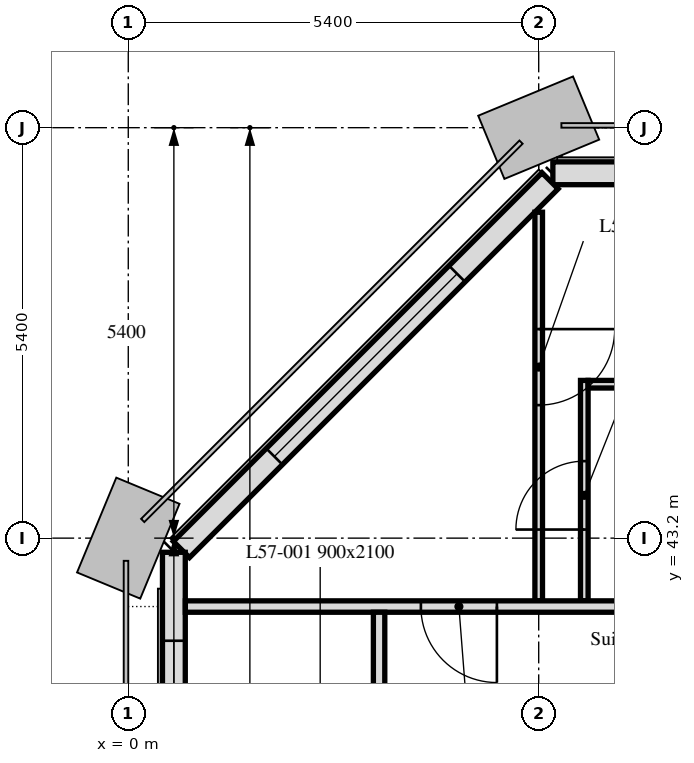
"""IFC4 building model, lengths in metres.
Left out: names, types, materials, properties, quantities, classifications, styles, units other than length and angle.
Written with IfcOpenShell. Run it as: python <this file> out.ifc"""

import sys

from ifc_helpers import new_model, si_unit, direction, frame, frame_2d, origin, place, context, subcontext, project, spatial, rectangle, extrude, element, fill, save


model = new_model("IFC4")
c1 = context("Model", 3, precision=1e-05, world=origin(), true_north=direction((0.0, 1.0)))
c2 = subcontext(c1, "Body", "Model", "MODEL_VIEW")
j1 = project(units=[si_unit("LENGTHUNIT", "METRE"), si_unit("PLANEANGLEUNIT", "RADIAN")], contexts=[c1])
p1 = place(None, origin())
s1 = spatial("IfcSite", under=j1, at=p1, CompositionType="ELEMENT")
p2 = place(p1, origin())
s2 = spatial("IfcBuilding", under=s1, at=p2, CompositionType="ELEMENT")
p3 = place(p2, frame((0.0, 0.0, 226.9)))
s3 = spatial("IfcBuildingStorey", under=s2, at=p3, CompositionType="ELEMENT", Elevation=226.9)
p4 = place(p3, frame((37.614, 48.0, 0.0), z_axis=(0.0, 0.0, 1.0), x_axis=(-1.0, 0.0, 0.0)))
e1 = element("IfcWall", 1, at=p4, inside=s3, PredefinedType="SOLIDWALL", context=c2, shape_type="SweptSolid", body=[
    extrude(rectangle(XDim=32.027, YDim=0.3, at=frame_2d((16.014, 0.0))), origin(), (0.0, 0.0, 1.0), 3.0),
])
p5 = place(p4, frame((0.814, 0.0, 0.9)))
e2 = element("IfcOpeningElement", 2, at=p5, cuts=e1, PredefinedType="OPENING", context=c2, shape_type="SweptSolid", body=[
    extrude(rectangle(XDim=3.4, YDim=1.7, at=frame_2d((1.7, 0.85))), frame((0.0, 0.16, 0.0), z_axis=(0.0, -1.0, 0.0), x_axis=(1.0, 0.0, 0.0)), (0.0, 0.0, 1.0), 0.32),
])
p6 = place(p4, frame((6.564, 0.0, 0.9)))
e3 = element("IfcOpeningElement", 3, at=p6, cuts=e1, PredefinedType="OPENING", context=c2, shape_type="SweptSolid", body=[
    extrude(rectangle(XDim=1.1, YDim=1.7, at=frame_2d((0.55, 0.85))), frame((0.0, 0.16, 0.0), z_axis=(0.0, -1.0, 0.0), x_axis=(1.0, 0.0, 0.0)), (0.0, 0.0, 1.0), 0.32),
])
p7 = place(p4, frame((11.614, 0.0, 0.9)))
e4 = element("IfcOpeningElement", 4, at=p7, cuts=e1, PredefinedType="OPENING", context=c2, shape_type="SweptSolid", body=[
    extrude(rectangle(XDim=3.4, YDim=1.7, at=frame_2d((1.7, 0.85))), frame((0.0, 0.16, 0.0), z_axis=(0.0, -1.0, 0.0), x_axis=(1.0, 0.0, 0.0)), (0.0, 0.0, 1.0), 0.32),
])
p8 = place(p4, frame((17.364, 0.0, 0.9)))
e5 = element("IfcOpeningElement", 5, at=p8, cuts=e1, PredefinedType="OPENING", context=c2, shape_type="SweptSolid", body=[
    extrude(rectangle(XDim=1.1, YDim=1.7, at=frame_2d((0.55, 0.85))), frame((0.0, 0.16, 0.0), z_axis=(0.0, -1.0, 0.0), x_axis=(1.0, 0.0, 0.0)), (0.0, 0.0, 1.0), 0.32),
])
p9 = place(p4, frame((22.414, 0.0, 0.9)))
e6 = element("IfcOpeningElement", 6, at=p9, cuts=e1, PredefinedType="OPENING", context=c2, shape_type="SweptSolid", body=[
    extrude(rectangle(XDim=3.4, YDim=1.7, at=frame_2d((1.7, 0.85))), frame((0.0, 0.16, 0.0), z_axis=(0.0, -1.0, 0.0), x_axis=(1.0, 0.0, 0.0)), (0.0, 0.0, 1.0), 0.32),
])
p10 = place(p4, frame((28.164, 0.0, 0.9)))
e7 = element("IfcOpeningElement", 7, at=p10, cuts=e1, PredefinedType="OPENING", context=c2, shape_type="SweptSolid", body=[
    extrude(rectangle(XDim=1.1, YDim=1.7, at=frame_2d((0.55, 0.85))), frame((0.0, 0.16, 0.0), z_axis=(0.0, -1.0, 0.0), x_axis=(1.0, 0.0, 0.0)), (0.0, 0.0, 1.0), 0.32),
])
p11 = place(p3, frame((5.55, 47.901, 0.0), z_axis=(0.0, 0.0, 1.0), x_axis=(-0.707106781187, -0.707106781187, 0.0)))
e8 = element("IfcWall", 8, at=p11, inside=s3, PredefinedType="SOLIDWALL", context=c2, shape_type="SweptSolid", body=[
    extrude(rectangle(XDim=6.86, YDim=0.3, at=frame_2d((3.43, 0.0))), origin(), (0.0, 0.0, 1.0), 3.0),
])
p12 = place(p11, frame((1.73, 0.0, 0.9)))
e9 = element("IfcOpeningElement", 9, at=p12, cuts=e8, PredefinedType="OPENING", context=c2, shape_type="SweptSolid", body=[
    extrude(rectangle(XDim=3.4, YDim=1.7, at=frame_2d((1.7, 0.85))), frame((0.0, 0.16, 0.0), z_axis=(0.0, -1.0, 0.0), x_axis=(1.0, 0.0, 0.0)), (0.0, 0.0, 1.0), 0.32),
])
p13 = place(p3, frame((0.6, 43.014, 0.0), z_axis=(0.0, 0.0, 1.0), x_axis=(0.0, -1.0, 0.0)))
e10 = element("IfcWall", 10, at=p13, inside=s3, PredefinedType="SOLIDWALL", context=c2, shape_type="SweptSolid", body=[
    extrude(rectangle(XDim=32.027, YDim=0.3, at=frame_2d((16.014, 0.0))), origin(), (0.0, 0.0, 1.0), 3.0),
])
p14 = place(p13, frame((1.164, 0.0, 0.9)))
e11 = element("IfcOpeningElement", 11, at=p14, cuts=e10, PredefinedType="OPENING", context=c2, shape_type="SweptSolid", body=[
    extrude(rectangle(XDim=1.1, YDim=1.7, at=frame_2d((0.55, 0.85))), frame((0.0, 0.16, 0.0), z_axis=(0.0, -1.0, 0.0), x_axis=(1.0, 0.0, 0.0)), (0.0, 0.0, 1.0), 0.32),
])
p15 = place(p13, frame((2.589, 0.0, 0.9)))
e12 = element("IfcOpeningElement", 12, at=p15, cuts=e10, PredefinedType="OPENING", context=c2, shape_type="SweptSolid", body=[
    extrude(rectangle(XDim=0.65, YDim=1.7, at=frame_2d((0.325, 0.85))), frame((0.0, 0.16, 0.0), z_axis=(0.0, -1.0, 0.0), x_axis=(1.0, 0.0, 0.0)), (0.0, 0.0, 1.0), 0.32),
])
p16 = place(p13, frame((6.564, 0.0, 0.9)))
e13 = element("IfcOpeningElement", 13, at=p16, cuts=e10, PredefinedType="OPENING", context=c2, shape_type="SweptSolid", body=[
    extrude(rectangle(XDim=1.1, YDim=1.7, at=frame_2d((0.55, 0.85))), frame((0.0, 0.16, 0.0), z_axis=(0.0, -1.0, 0.0), x_axis=(1.0, 0.0, 0.0)), (0.0, 0.0, 1.0), 0.32),
])
p17 = place(p13, frame((8.164, 0.0, 0.9)))
e14 = element("IfcOpeningElement", 14, at=p17, cuts=e10, PredefinedType="OPENING", context=c2, shape_type="SweptSolid", body=[
    extrude(rectangle(XDim=1.1, YDim=1.7, at=frame_2d((0.55, 0.85))), frame((0.0, 0.16, 0.0), z_axis=(0.0, -1.0, 0.0), x_axis=(1.0, 0.0, 0.0)), (0.0, 0.0, 1.0), 0.32),
])
p18 = place(p13, frame((11.614, 0.0, 0.9)))
e15 = element("IfcOpeningElement", 15, at=p18, cuts=e10, PredefinedType="OPENING", context=c2, shape_type="SweptSolid", body=[
    extrude(rectangle(XDim=3.4, YDim=1.7, at=frame_2d((1.7, 0.85))), frame((0.0, 0.16, 0.0), z_axis=(0.0, -1.0, 0.0), x_axis=(1.0, 0.0, 0.0)), (0.0, 0.0, 1.0), 0.32),
])
p19 = place(p13, frame((17.364, 0.0, 0.9)))
e16 = element("IfcOpeningElement", 16, at=p19, cuts=e10, PredefinedType="OPENING", context=c2, shape_type="SweptSolid", body=[
    extrude(rectangle(XDim=1.1, YDim=1.7, at=frame_2d((0.55, 0.85))), frame((0.0, 0.16, 0.0), z_axis=(0.0, -1.0, 0.0), x_axis=(1.0, 0.0, 0.0)), (0.0, 0.0, 1.0), 0.32),
])
p20 = place(p13, frame((18.964, 0.0, 0.9)))
e17 = element("IfcOpeningElement", 17, at=p20, cuts=e10, PredefinedType="OPENING", context=c2, shape_type="SweptSolid", body=[
    extrude(rectangle(XDim=1.1, YDim=1.7, at=frame_2d((0.55, 0.85))), frame((0.0, 0.16, 0.0), z_axis=(0.0, -1.0, 0.0), x_axis=(1.0, 0.0, 0.0)), (0.0, 0.0, 1.0), 0.32),
])
p21 = place(p13, frame((22.414, 0.0, 0.9)))
e18 = element("IfcOpeningElement", 18, at=p21, cuts=e10, PredefinedType="OPENING", context=c2, shape_type="SweptSolid", body=[
    extrude(rectangle(XDim=3.4, YDim=1.7, at=frame_2d((1.7, 0.85))), frame((0.0, 0.16, 0.0), z_axis=(0.0, -1.0, 0.0), x_axis=(1.0, 0.0, 0.0)), (0.0, 0.0, 1.0), 0.32),
])
p22 = place(p13, frame((28.164, 0.0, 0.9)))
e19 = element("IfcOpeningElement", 19, at=p22, cuts=e10, PredefinedType="OPENING", context=c2, shape_type="SweptSolid", body=[
    extrude(rectangle(XDim=1.1, YDim=1.7, at=frame_2d((0.55, 0.85))), frame((0.0, 0.16, 0.0), z_axis=(0.0, -1.0, 0.0), x_axis=(1.0, 0.0, 0.0)), (0.0, 0.0, 1.0), 0.32),
])
p23 = place(p13, frame((29.764, 0.0, 0.9)))
e20 = element("IfcOpeningElement", 20, at=p23, cuts=e10, PredefinedType="OPENING", context=c2, shape_type="SweptSolid", body=[
    extrude(rectangle(XDim=1.1, YDim=1.7, at=frame_2d((0.55, 0.85))), frame((0.0, 0.16, 0.0), z_axis=(0.0, -1.0, 0.0), x_axis=(1.0, 0.0, 0.0)), (0.0, 0.0, 1.0), 0.32),
])
p24 = place(p3, frame((5.4, 47.488, 0.0), z_axis=(0.0, 0.0, 1.0), x_axis=(0.0, -1.0, 0.0)))
e21 = element("IfcWall", 21, at=p24, inside=s3, PredefinedType="PARTITIONING", context=c2, shape_type="SweptSolid", body=[
    extrude(rectangle(XDim=5.113, YDim=0.1, at=frame_2d((2.556, 0.0))), origin(), (0.0, 0.0, 1.0), 3.0),
])
p25 = place(p24, frame((1.538, 0.0, 0.0)))
e22 = element("IfcOpeningElement", 22, at=p25, cuts=e21, PredefinedType="OPENING", context=c2, shape_type="SweptSolid", body=[
    extrude(rectangle(XDim=1.0, YDim=2.1, at=frame_2d((0.5, 1.05))), frame((0.0, 0.05, 0.0), z_axis=(0.0, -1.0, 0.0), x_axis=(1.0, 0.0, 0.0)), (0.0, 0.0, 1.0), 0.1),
])
p26 = place(p3, frame((6.0, 42.375, 0.0), z_axis=(0.0, 0.0, 1.0), x_axis=(0.0, 1.0, 0.0)))
e23 = element("IfcWall", 23, at=p26, inside=s3, PredefinedType="PARTITIONING", context=c2, shape_type="SweptSolid", body=[
    extrude(rectangle(XDim=2.9, YDim=0.1, at=frame_2d((1.45, 0.0))), origin(), (0.0, 0.0, 1.0), 3.0),
])
p27 = place(p26, frame((0.938, 0.0, 0.0)))
e24 = element("IfcOpeningElement", 24, at=p27, cuts=e23, PredefinedType="OPENING", context=c2, shape_type="SweptSolid", body=[
    extrude(rectangle(XDim=0.9, YDim=2.1, at=frame_2d((0.45, 1.05))), frame((0.0, 0.05, 0.0), z_axis=(0.0, -1.0, 0.0), x_axis=(1.0, 0.0, 0.0)), (0.0, 0.0, 1.0), 0.1),
])
p28 = place(p3, frame((6.05, 45.225, 0.0), z_axis=(0.0, 0.0, 1.0), x_axis=(1.0, 0.0, 0.0)))
e25 = element("IfcWall", 25, at=p28, inside=s3, PredefinedType="PARTITIONING", context=c2, shape_type="SweptSolid", body=[
    extrude(rectangle(XDim=2.4, YDim=0.1, at=frame_2d((1.2, 0.0))), origin(), (0.0, 0.0, 1.0), 3.0),
])
p29 = place(p3, frame((42.449, 42.3, 0.0), z_axis=(0.0, 0.0, 1.0), x_axis=(-1.0, 0.0, 0.0)))
e26 = element("IfcWall", 26, at=p29, inside=s3, PredefinedType="PARTITIONING", context=c2, shape_type="SweptSolid", body=[
    extrude(rectangle(XDim=41.698, YDim=0.15, at=frame_2d((20.849, 0.0))), origin(), (0.0, 0.0, 1.0), 2.4),
])
p30 = place(p29, frame((1.132, 0.0, 0.0)))
e27 = element("IfcOpeningElement", 27, at=p30, cuts=e26, PredefinedType="OPENING", context=c2, shape_type="SweptSolid", body=[
    extrude(rectangle(XDim=1.0, YDim=2.1, at=frame_2d((0.5, 1.05))), frame((0.0, 0.075, 0.0), z_axis=(0.0, -1.0, 0.0), x_axis=(1.0, 0.0, 0.0)), (0.0, 0.0, 1.0), 0.15),
])
p31 = place(p29, frame((13.049, 0.0, 0.0)))
e28 = element("IfcOpeningElement", 28, at=p31, cuts=e26, PredefinedType="OPENING", context=c2, shape_type="SweptSolid", body=[
    extrude(rectangle(XDim=1.0, YDim=2.1, at=frame_2d((0.5, 1.05))), frame((0.0, 0.075, 0.0), z_axis=(0.0, -1.0, 0.0), x_axis=(1.0, 0.0, 0.0)), (0.0, 0.0, 1.0), 0.15),
])
p32 = place(p29, frame((18.449, 0.0, 0.0)))
e29 = element("IfcOpeningElement", 29, at=p32, cuts=e26, PredefinedType="OPENING", context=c2, shape_type="SweptSolid", body=[
    extrude(rectangle(XDim=1.0, YDim=2.1, at=frame_2d((0.5, 1.05))), frame((0.0, 0.075, 0.0), z_axis=(0.0, -1.0, 0.0), x_axis=(1.0, 0.0, 0.0)), (0.0, 0.0, 1.0), 0.15),
])
p33 = place(p29, frame((23.049, 0.0, 0.0)))
e30 = element("IfcOpeningElement", 30, at=p33, cuts=e26, PredefinedType="OPENING", context=c2, shape_type="SweptSolid", body=[
    extrude(rectangle(XDim=1.0, YDim=2.1, at=frame_2d((0.5, 1.05))), frame((0.0, 0.075, 0.0), z_axis=(0.0, -1.0, 0.0), x_axis=(1.0, 0.0, 0.0)), (0.0, 0.0, 1.0), 0.15),
])
p34 = place(p29, frame((37.599, 0.0, 0.0)))
e31 = element("IfcOpeningElement", 31, at=p34, cuts=e26, PredefinedType="OPENING", context=c2, shape_type="SweptSolid", body=[
    extrude(rectangle(XDim=1.0, YDim=2.1, at=frame_2d((0.5, 1.05))), frame((0.0, 0.075, 0.0), z_axis=(0.0, -1.0, 0.0), x_axis=(1.0, 0.0, 0.0)), (0.0, 0.0, 1.0), 0.15),
])
p35 = place(p3, frame((3.3, 11.775, 0.0), z_axis=(0.0, 0.0, 1.0), x_axis=(0.0, 1.0, 0.0)))
e32 = element("IfcWall", 32, at=p35, inside=s3, PredefinedType="PARTITIONING", context=c2, shape_type="SweptSolid", body=[
    extrude(rectangle(XDim=30.45, YDim=0.15, at=frame_2d((15.225, 0.0))), origin(), (0.0, 0.0, 1.0), 2.4),
])
p36 = place(p35, frame((17.425, 0.0, 0.0)))
e33 = element("IfcOpeningElement", 33, at=p36, cuts=e32, PredefinedType="OPENING", context=c2, shape_type="SweptSolid", body=[
    extrude(rectangle(XDim=1.0, YDim=2.1, at=frame_2d((0.5, 1.05))), frame((0.0, 0.075, 0.0), z_axis=(0.0, -1.0, 0.0), x_axis=(1.0, 0.0, 0.0)), (0.0, 0.0, 1.0), 0.15),
])
p37 = place(p35, frame((1.675, 0.0, 0.0)))
e34 = element("IfcOpeningElement", 34, at=p37, cuts=e32, PredefinedType="OPENING", context=c2, shape_type="SweptSolid", body=[
    extrude(rectangle(XDim=1.0, YDim=2.1, at=frame_2d((0.5, 1.05))), frame((0.0, 0.075, 0.0), z_axis=(0.0, -1.0, 0.0), x_axis=(1.0, 0.0, 0.0)), (0.0, 0.0, 1.0), 0.15),
])
p38 = place(p35, frame((9.325, 0.0, 0.0)))
e35 = element("IfcOpeningElement", 35, at=p38, cuts=e32, PredefinedType="OPENING", context=c2, shape_type="SweptSolid", body=[
    extrude(rectangle(XDim=1.0, YDim=2.1, at=frame_2d((0.5, 1.05))), frame((0.0, 0.075, 0.0), z_axis=(0.0, -1.0, 0.0), x_axis=(1.0, 0.0, 0.0)), (0.0, 0.0, 1.0), 0.15),
])
p39 = place(p35, frame((23.258, 0.0, 0.0)))
e36 = element("IfcOpeningElement", 36, at=p39, cuts=e32, PredefinedType="OPENING", context=c2, shape_type="SweptSolid", body=[
    extrude(rectangle(XDim=1.0, YDim=2.1, at=frame_2d((0.5, 1.05))), frame((0.0, 0.075, 0.0), z_axis=(0.0, -1.0, 0.0), x_axis=(1.0, 0.0, 0.0)), (0.0, 0.0, 1.0), 0.15),
])
p40 = place(p12, origin())
e37 = element("IfcWindow", 37, at=p40, inside=s3, PartitioningType="SINGLE_PANEL", PredefinedType="WINDOW", context=c2, shape_type="SweptSolid", body=[
    extrude(rectangle(XDim=3.4, YDim=1.7, at=frame_2d((1.7, 0.85))), frame((0.0, 0.03, 0.0), z_axis=(0.0, -1.0, 0.0), x_axis=(1.0, 0.0, 0.0)), (0.0, 0.0, 1.0), 0.06),
])
fill(e9, e37)
p41 = place(p14, origin())
e38 = element("IfcWindow", 38, at=p41, inside=s3, PartitioningType="SINGLE_PANEL", PredefinedType="WINDOW", context=c2, shape_type="SweptSolid", body=[
    extrude(rectangle(XDim=1.1, YDim=1.7, at=frame_2d((0.55, 0.85))), frame((0.0, 0.03, 0.0), z_axis=(0.0, -1.0, 0.0), x_axis=(1.0, 0.0, 0.0)), (0.0, 0.0, 1.0), 0.06),
])
fill(e11, e38)
p42 = place(p27, origin())
e39 = element("IfcDoor", 39, at=p42, inside=s3, OperationType="SINGLE_SWING_LEFT", PredefinedType="DOOR", context=c2, shape_type="SweptSolid", body=[
    extrude(rectangle(XDim=0.9, YDim=2.1, at=frame_2d((0.45, 1.05))), frame((0.0, 0.025, 0.0), z_axis=(0.0, -1.0, 0.0), x_axis=(1.0, 0.0, 0.0)), (0.0, 0.0, 1.0), 0.05),
])
fill(e24, e39)
p43 = place(p25, origin())
e40 = element("IfcDoor", 40, at=p43, inside=s3, OperationType="SINGLE_SWING_LEFT", PredefinedType="DOOR", context=c2, shape_type="SweptSolid", body=[
    extrude(rectangle(XDim=1.0, YDim=2.1, at=frame_2d((0.5, 1.05))), frame((0.0, 0.025, 0.0), z_axis=(0.0, -1.0, 0.0), x_axis=(1.0, 0.0, 0.0)), (0.0, 0.0, 1.0), 0.05),
])
fill(e22, e40)
p44 = place(p34, origin())
e41 = element("IfcDoor", 41, at=p44, inside=s3, OperationType="SINGLE_SWING_RIGHT", PredefinedType="DOOR", context=c2, shape_type="SweptSolid", body=[
    extrude(rectangle(XDim=1.0, YDim=2.1, at=frame_2d((0.5, 1.05))), frame((0.0, 0.025, 0.0), z_axis=(0.0, -1.0, 0.0), x_axis=(1.0, 0.0, 0.0)), (0.0, 0.0, 1.0), 0.05),
])
fill(e31, e41)
save(model, sys.argv[1])
